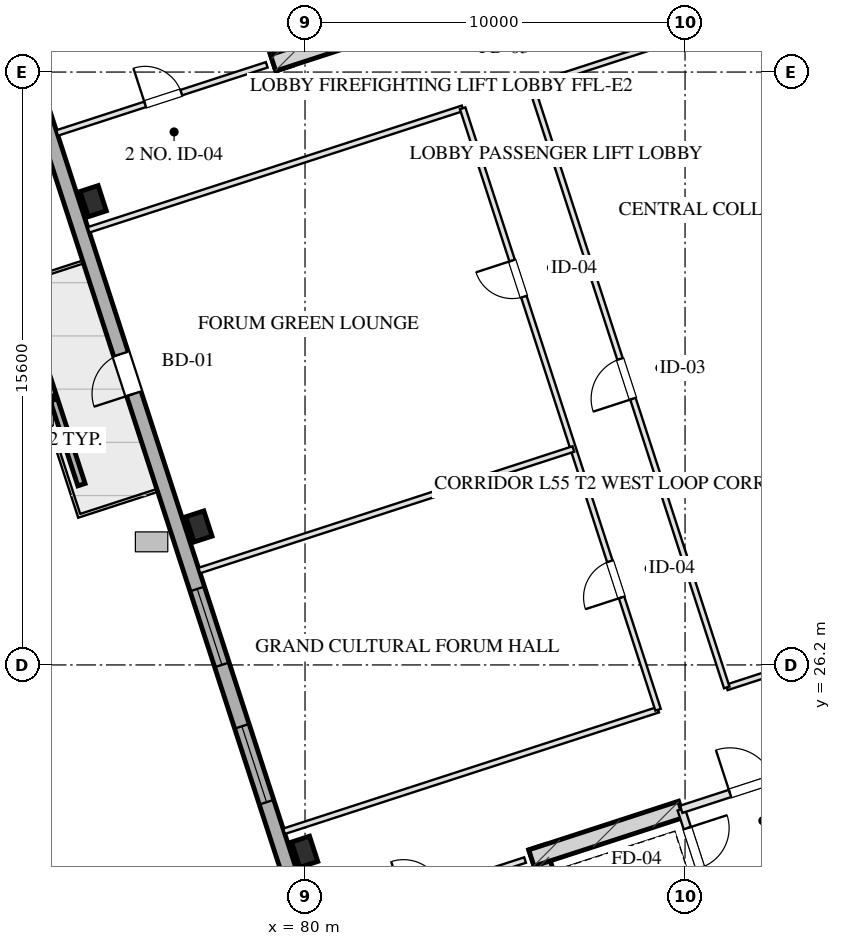
"""IFC4 building model, lengths in metres.
Left out: names, types, materials, properties, quantities, classifications, styles, units other than length and angle.
Written with IfcOpenShell. Run it as: python <this file> out.ifc"""

import sys

from ifc_helpers import new_model, si_unit, direction, frame, frame_2d, origin, origin_2d, place, context, subcontext, project, spatial, rectangle, hollow_rectangle, extrude, element, fill, save


model = new_model("IFC4")
c1 = context("Model", 3, precision=1e-05, world=origin(), true_north=direction((0.0, 1.0)))
c2 = subcontext(c1, "Body", "Model", "MODEL_VIEW")
j1 = project(units=[si_unit("LENGTHUNIT", "METRE"), si_unit("PLANEANGLEUNIT", "RADIAN")], contexts=[c1])
p1 = place(None, origin())
s1 = spatial("IfcSite", under=j1, at=p1, CompositionType="ELEMENT")
p2 = place(p1, origin())
s2 = spatial("IfcBuilding", under=s1, at=p2, CompositionType="ELEMENT")
p3 = place(p2, frame((0.0, 0.0, 205.85)))
s3 = spatial("IfcBuildingStorey", under=s2, at=p3, CompositionType="ELEMENT", Elevation=205.85)
p4 = place(p3, frame((86.102, 21.404, 0.0), z_axis=(0.0, 0.0, 1.0), x_axis=(0.309035778627, -0.951050412717, 0.0)))
e1 = element("IfcWall", 1, at=p4, inside=s3, PredefinedType="SHEAR", context=c2, shape_type="SweptSolid", body=[
    extrude(rectangle(XDim=9.33, YDim=0.45, at=frame_2d((4.665, 0.0))), origin(), (0.0, 0.0, 1.0), 3.45),
])
p5 = place(p3, frame((85.957, 21.12, 0.0), z_axis=(0.0, 0.0, 1.0), x_axis=(0.951064796122, 0.308991510526, 0.0)))
e2 = element("IfcWall", 2, at=p5, inside=s3, PredefinedType="SHEAR", context=c2, shape_type="SweptSolid", body=[
    extrude(rectangle(XDim=4.145, YDim=0.45, at=frame_2d((2.073, 0.0))), origin(), (0.0, 0.0, 1.0), 3.45),
])
p6 = place(p3, frame((79.442, 41.899, 0.0), z_axis=(0.0, 0.0, 1.0), x_axis=(-0.309035778627, 0.951050412717, 0.0)))
e3 = element("IfcWall", 3, at=p6, inside=s3, PredefinedType="SHEAR", context=c2, shape_type="SweptSolid", body=[
    extrude(rectangle(XDim=9.33, YDim=0.45, at=frame_2d((4.665, 0.0))), origin(), (0.0, 0.0, 1.0), 3.45),
])
p7 = place(p3, frame((79.159, 42.043, 0.0), z_axis=(0.0, 0.0, 1.0), x_axis=(0.951047485828, 0.309044785913, 0.0)))
e4 = element("IfcWall", 4, at=p7, inside=s3, PredefinedType="SHEAR", context=c2, shape_type="SweptSolid", body=[
    extrude(rectangle(XDim=4.145, YDim=0.45, at=frame_2d((2.073, 0.0))), origin(), (0.0, 0.0, 1.0), 3.45),
])
for number, where, z_axis, x_axis in (
    (5, (79.99, 21.284, 0.0), (0.0, 0.0, 1.0), (0.951, 0.309, 0.0)),
    (6, (77.208, 29.844, 0.0), (0.0, 0.0, 1.0), (0.951, 0.309, 0.0)),
    (7, (74.427, 38.403, 0.0), (0.0, 0.0, 1.0), (0.951, 0.309, 0.0)),
):
    element("IfcColumn", number, at=place(p3, frame(where, z_axis=z_axis, x_axis=x_axis)), inside=s3, PredefinedType="COLUMN", context=c2, shape_type="SweptSolid", body=[
        extrude(hollow_rectangle(XDim=0.5, YDim=0.7, WallThickness=0.025, at=origin_2d()), origin(), (0.0, 0.0, 1.0), 3.451),
    ])
p8 = place(p3, frame((82.618, 11.414, 0.0), z_axis=(0.0, 0.0, 1.0), x_axis=(-0.309016491071, 0.951056679828, 0.0)))
e8 = element("IfcWall", 8, at=p8, inside=s3, PredefinedType="SOLIDWALL", context=c2, shape_type="SweptSolid", body=[
    extrude(rectangle(XDim=38.4, YDim=0.4, at=frame_2d((19.2, 0.0))), origin(), (0.0, 0.0, 1.0), 2.61),
])
p9 = place(p8, frame((11.75, 0.0, 0.75)))
e9 = element("IfcOpeningElement", 9, at=p9, cuts=e8, PredefinedType="OPENING", context=c2, shape_type="SweptSolid", body=[
    extrude(rectangle(XDim=2.1, YDim=1.46, at=frame_2d((1.05, 0.73))), frame((0.0, 0.21, 0.0), z_axis=(0.0, -1.0, 0.0), x_axis=(1.0, 0.0, 0.0)), (0.0, 0.0, 1.0), 0.42),
])
p10 = place(p8, frame((15.55, 0.0, 0.75)))
e10 = element("IfcOpeningElement", 10, at=p10, cuts=e8, PredefinedType="OPENING", context=c2, shape_type="SweptSolid", body=[
    extrude(rectangle(XDim=2.1, YDim=1.46, at=frame_2d((1.05, 0.73))), frame((0.0, 0.21, 0.0), z_axis=(0.0, -1.0, 0.0), x_axis=(1.0, 0.0, 0.0)), (0.0, 0.0, 1.0), 0.42),
])
p11 = place(p8, frame((23.05, 0.0, 0.0)))
e11 = element("IfcOpeningElement", 11, at=p11, cuts=e8, PredefinedType="OPENING", context=c2, shape_type="SweptSolid", body=[
    extrude(rectangle(XDim=1.1, YDim=2.15, at=frame_2d((0.55, 1.075))), frame((0.0, 0.21, 0.0), z_axis=(0.0, -1.0, 0.0), x_axis=(1.0, 0.0, 0.0)), (0.0, 0.0, 1.0), 0.42),
])
p12 = place(p3, frame((74.117, 30.942, 0.0), z_axis=(0.0, 0.0, 1.0), x_axis=(-0.308986014439, 0.951066581729, 0.0)))
e12 = element("IfcWall", 12, at=p12, inside=s3, PredefinedType="PARAPET", context=c2, shape_type="SweptSolid", body=[
    extrude(rectangle(XDim=4.8, YDim=0.2, at=frame_2d((2.4, 0.0))), origin(), (0.0, 0.0, 1.0), 0.75),
])
p13 = place(p3, frame((89.899, 22.401, 0.0), z_axis=(0.0, 0.0, 1.0), x_axis=(0.308932062672, -0.951084108086, 0.0)))
e13 = element("IfcWall", 13, at=p13, inside=s3, PredefinedType="PARTITIONING", context=c2, shape_type="SweptSolid", body=[
    extrude(rectangle(XDim=1.9, YDim=0.2, at=frame_2d((0.95, 0.0))), origin(), (0.0, 0.0, 1.0), 3.175),
])
p14 = place(p13, frame((0.52, 0.0, 0.0)))
e14 = element("IfcOpeningElement", 14, at=p14, cuts=e13, PredefinedType="OPENING", context=c2, shape_type="SweptSolid", body=[
    extrude(rectangle(XDim=1.1, YDim=2.05, at=frame_2d((0.55, 1.025))), frame((0.0, 0.11, 0.0), z_axis=(0.0, -1.0, 0.0), x_axis=(1.0, 0.0, 0.0)), (0.0, 0.0, 1.0), 0.22),
])
p15 = place(p3, frame((89.899, 22.401, 0.0), z_axis=(0.0, 0.0, 1.0), x_axis=(0.951046716504, 0.309047153403, 0.0)))
e15 = element("IfcWall", 15, at=p15, inside=s3, PredefinedType="PARTITIONING", context=c2, shape_type="SweptSolid", body=[
    extrude(rectangle(XDim=3.83, YDim=0.2, at=frame_2d((1.915, 0.0))), origin(), (0.0, 0.0, 1.0), 3.175),
])
p16 = place(p15, frame((1.35, 0.0, 0.0)))
e16 = element("IfcOpeningElement", 16, at=p16, cuts=e15, PredefinedType="OPENING", context=c2, shape_type="SweptSolid", body=[
    extrude(rectangle(XDim=1.2, YDim=2.05, at=frame_2d((0.6, 1.025))), frame((0.0, 0.11, 0.0), z_axis=(0.0, -1.0, 0.0), x_axis=(1.0, 0.0, 0.0)), (0.0, 0.0, 1.0), 0.22),
])
p17 = place(p3, frame((80.275, 19.274, 0.0), z_axis=(0.0, 0.0, 1.0), x_axis=(0.951059431056, 0.309008023519, 0.0)))
e17 = element("IfcWall", 17, at=p17, inside=s3, PredefinedType="PARTITIONING", context=c2, shape_type="SweptSolid", body=[
    extrude(rectangle(XDim=5.8, YDim=0.15, at=frame_2d((2.9, 0.0))), origin(), (0.0, 0.0, 1.0), 3.175),
])
p18 = place(p17, frame((2.436, 0.0, 0.0)))
e18 = element("IfcOpeningElement", 18, at=p18, cuts=e17, PredefinedType="OPENING", context=c2, shape_type="SweptSolid", body=[
    extrude(rectangle(XDim=1.05, YDim=2.05, at=frame_2d((0.525, 1.025))), frame((0.0, 0.085, 0.0), z_axis=(0.0, -1.0, 0.0), x_axis=(1.0, 0.0, 0.0)), (0.0, 0.0, 1.0), 0.17),
])
p19 = place(p3, frame((73.476, 40.197, 0.0), z_axis=(0.0, 0.0, 1.0), x_axis=(0.951059431056, 0.309008023519, 0.0)))
e19 = element("IfcWall", 19, at=p19, inside=s3, PredefinedType="PARTITIONING", context=c2, shape_type="SweptSolid", body=[
    extrude(rectangle(XDim=5.8, YDim=0.15, at=frame_2d((2.9, 0.0))), origin(), (0.0, 0.0, 1.0), 3.175),
])
p20 = place(p19, frame((2.436, 0.0, 0.0)))
e20 = element("IfcOpeningElement", 20, at=p20, cuts=e19, PredefinedType="OPENING", context=c2, shape_type="SweptSolid", body=[
    extrude(rectangle(XDim=1.0, YDim=2.05, at=frame_2d((0.5, 1.025))), frame((0.0, 0.085, 0.0), z_axis=(0.0, -1.0, 0.0), x_axis=(1.0, 0.0, 0.0)), (0.0, 0.0, 1.0), 0.17),
])
p21 = place(p3, frame((79.447, 21.823, 0.0), z_axis=(0.0, 0.0, 1.0), x_axis=(0.951057294912, 0.309014598029, 0.0)))
e21 = element("IfcWall", 21, at=p21, inside=s3, PredefinedType="PARTITIONING", context=c2, shape_type="SweptSolid", body=[
    extrude(rectangle(XDim=10.35, YDim=0.15, at=frame_2d((5.175, 0.0))), origin(), (0.0, 0.0, 1.0), 3.175),
])
p22 = place(p3, frame((91.097, 25.608, 0.0), z_axis=(0.0, 0.0, 1.0), x_axis=(0.951053063704, 0.309027620156, 0.0)))
e22 = element("IfcWall", 22, at=p22, inside=s3, PredefinedType="PARTITIONING", context=c2, shape_type="SweptSolid", body=[
    extrude(rectangle(XDim=9.35, YDim=0.15, at=frame_2d((4.675, 0.0))), origin(), (0.0, 0.0, 1.0), 3.175),
])
p23 = place(p3, frame((74.304, 37.648, 0.0), z_axis=(0.0, 0.0, 1.0), x_axis=(0.951059547341, 0.309007665621, 0.0)))
e23 = element("IfcWall", 23, at=p23, inside=s3, PredefinedType="PARTITIONING", context=c2, shape_type="SweptSolid", body=[
    extrude(rectangle(XDim=10.35, YDim=0.15, at=frame_2d((5.175, 0.0))), origin(), (0.0, 0.0, 1.0), 3.175),
])
p24 = place(p3, frame((85.955, 41.434, 0.0), z_axis=(0.0, 0.0, 1.0), x_axis=(0.951053063704, 0.309027620156, 0.0)))
e24 = element("IfcWall", 24, at=p24, inside=s3, PredefinedType="PARTITIONING", context=c2, shape_type="SweptSolid", body=[
    extrude(rectangle(XDim=9.35, YDim=0.15, at=frame_2d((4.675, 0.0))), origin(), (0.0, 0.0, 1.0), 3.175),
])
p25 = place(p3, frame((89.29, 25.021, 0.0), z_axis=(0.0, 0.0, 1.0), x_axis=(-0.309004459387, 0.951060589068, 0.0)))
e25 = element("IfcWall", 25, at=p25, inside=s3, PredefinedType="PARTITIONING", context=c2, shape_type="SweptSolid", body=[
    extrude(rectangle(XDim=16.64, YDim=0.15, at=frame_2d((8.32, 0.0))), origin(), (0.0, 0.0, 1.0), 3.175),
])
p26 = place(p25, frame((3.107, 0.0, 0.0)))
e26 = element("IfcOpeningElement", 26, at=p26, cuts=e25, PredefinedType="OPENING", context=c2, shape_type="SweptSolid", body=[
    extrude(rectangle(XDim=1.0, YDim=2.05, at=frame_2d((0.5, 1.025))), frame((0.0, 0.085, 0.0), z_axis=(0.0, -1.0, 0.0), x_axis=(1.0, 0.0, 0.0)), (0.0, 0.0, 1.0), 0.17),
])
p27 = place(p25, frame((11.427, 0.0, 0.0)))
e27 = element("IfcOpeningElement", 27, at=p27, cuts=e25, PredefinedType="OPENING", context=c2, shape_type="SweptSolid", body=[
    extrude(rectangle(XDim=1.0, YDim=2.05, at=frame_2d((0.5, 1.025))), frame((0.0, 0.085, 0.0), z_axis=(0.0, -1.0, 0.0), x_axis=(1.0, 0.0, 0.0)), (0.0, 0.0, 1.0), 0.17),
])
p28 = place(p3, frame((91.097, 25.608, 0.0), z_axis=(0.0, 0.0, 1.0), x_axis=(-0.30901773025, 0.951056277195, 0.0)))
e28 = element("IfcWall", 28, at=p28, inside=s3, PredefinedType="PARTITIONING", context=c2, shape_type="SweptSolid", body=[
    extrude(rectangle(XDim=16.64, YDim=0.15, at=frame_2d((8.32, 0.0))), origin(), (0.0, 0.0, 1.0), 3.175),
])
p29 = place(p28, frame((7.987, 0.0, 0.0)))
e29 = element("IfcOpeningElement", 29, at=p29, cuts=e28, PredefinedType="OPENING", context=c2, shape_type="SweptSolid", body=[
    extrude(rectangle(XDim=1.1, YDim=2.05, at=frame_2d((0.55, 1.025))), frame((0.0, 0.085, 0.0), z_axis=(0.0, -1.0, 0.0), x_axis=(1.0, 0.0, 0.0)), (0.0, 0.0, 1.0), 0.17),
])
p30 = place(p3, frame((77.217, 28.684, 0.0), z_axis=(0.0, 0.0, 1.0), x_axis=(0.951059547341, 0.309007665621, 0.0)))
e30 = element("IfcWall", 30, at=p30, inside=s3, PredefinedType="PARTITIONING", context=c2, shape_type="SweptSolid", body=[
    extrude(rectangle(XDim=10.35, YDim=0.15, at=frame_2d((5.175, 0.0))), origin(), (0.0, 0.0, 1.0), 3.175),
])
p31 = place(p9, origin())
e31 = element("IfcWindow", 31, at=p31, inside=s3, PartitioningType="TRIPLE_PANEL_VERTICAL", PredefinedType="WINDOW", context=c2, shape_type="SweptSolid", body=[
    extrude(rectangle(XDim=2.1, YDim=1.46, at=frame_2d((1.05, 0.73))), frame((0.0, 0.03, 0.0), z_axis=(0.0, -1.0, 0.0), x_axis=(1.0, 0.0, 0.0)), (0.0, 0.0, 1.0), 0.06),
])
fill(e9, e31)
p32 = place(p10, origin())
e32 = element("IfcWindow", 32, at=p32, inside=s3, PartitioningType="TRIPLE_PANEL_VERTICAL", PredefinedType="WINDOW", context=c2, shape_type="SweptSolid", body=[
    extrude(rectangle(XDim=2.1, YDim=1.46, at=frame_2d((1.05, 0.73))), frame((0.0, 0.03, 0.0), z_axis=(0.0, -1.0, 0.0), x_axis=(1.0, 0.0, 0.0)), (0.0, 0.0, 1.0), 0.06),
])
fill(e10, e32)
p33 = place(p11, origin())
e33 = element("IfcDoor", 33, at=p33, inside=s3, OperationType="SINGLE_SWING_LEFT", PredefinedType="DOOR", context=c2, shape_type="SweptSolid", body=[
    extrude(rectangle(XDim=1.1, YDim=2.15, at=frame_2d((0.55, 1.075))), frame((0.0, 0.025, 0.0), z_axis=(0.0, -1.0, 0.0), x_axis=(1.0, 0.0, 0.0)), (0.0, 0.0, 1.0), 0.05),
])
fill(e11, e33)
p34 = place(p14, origin())
e34 = element("IfcDoor", 34, at=p34, inside=s3, OperationType="SINGLE_SWING_LEFT", PredefinedType="DOOR", context=c2, shape_type="SweptSolid", body=[
    extrude(rectangle(XDim=1.1, YDim=2.05, at=frame_2d((0.55, 1.025))), frame((0.0, 0.025, 0.0), z_axis=(0.0, -1.0, 0.0), x_axis=(1.0, 0.0, 0.0)), (0.0, 0.0, 1.0), 0.05),
])
fill(e14, e34)
p35 = place(p16, origin())
e35 = element("IfcDoor", 35, at=p35, inside=s3, OperationType="SINGLE_SWING_LEFT", PredefinedType="DOOR", context=c2, shape_type="SweptSolid", body=[
    extrude(rectangle(XDim=1.2, YDim=2.05, at=frame_2d((0.6, 1.025))), frame((0.0, 0.025, 0.0), z_axis=(0.0, -1.0, 0.0), x_axis=(1.0, 0.0, 0.0)), (0.0, 0.0, 1.0), 0.05),
])
fill(e16, e35)
p36 = place(p20, origin())
e36 = element("IfcDoor", 36, at=p36, inside=s3, OperationType="SINGLE_SWING_LEFT", PredefinedType="DOOR", context=c2, shape_type="SweptSolid", body=[
    extrude(rectangle(XDim=1.0, YDim=2.05, at=frame_2d((0.5, 1.025))), frame((0.0, 0.025, 0.0), z_axis=(0.0, -1.0, 0.0), x_axis=(1.0, 0.0, 0.0)), (0.0, 0.0, 1.0), 0.05),
])
fill(e20, e36)
p37 = place(p26, origin())
e37 = element("IfcDoor", 37, at=p37, inside=s3, OperationType="SINGLE_SWING_LEFT", PredefinedType="DOOR", context=c2, shape_type="SweptSolid", body=[
    extrude(rectangle(XDim=1.0, YDim=2.05, at=frame_2d((0.5, 1.025))), frame((0.0, 0.025, 0.0), z_axis=(0.0, -1.0, 0.0), x_axis=(1.0, 0.0, 0.0)), (0.0, 0.0, 1.0), 0.05),
])
fill(e26, e37)
p38 = place(p27, origin())
e38 = element("IfcDoor", 38, at=p38, inside=s3, OperationType="SINGLE_SWING_RIGHT", PredefinedType="DOOR", context=c2, shape_type="SweptSolid", body=[
    extrude(rectangle(XDim=1.0, YDim=2.05, at=frame_2d((0.5, 1.025))), frame((0.0, 0.025, 0.0), z_axis=(0.0, -1.0, 0.0), x_axis=(1.0, 0.0, 0.0)), (0.0, 0.0, 1.0), 0.05),
])
fill(e27, e38)
p39 = place(p29, origin())
e39 = element("IfcDoor", 39, at=p39, inside=s3, OperationType="SINGLE_SWING_LEFT", PredefinedType="DOOR", context=c2, shape_type="SweptSolid", body=[
    extrude(rectangle(XDim=1.1, YDim=2.05, at=frame_2d((0.55, 1.025))), frame((0.0, 0.025, 0.0), z_axis=(0.0, -1.0, 0.0), x_axis=(1.0, 0.0, 0.0)), (0.0, 0.0, 1.0), 0.05),
])
fill(e29, e39)
save(model, sys.argv[1])
